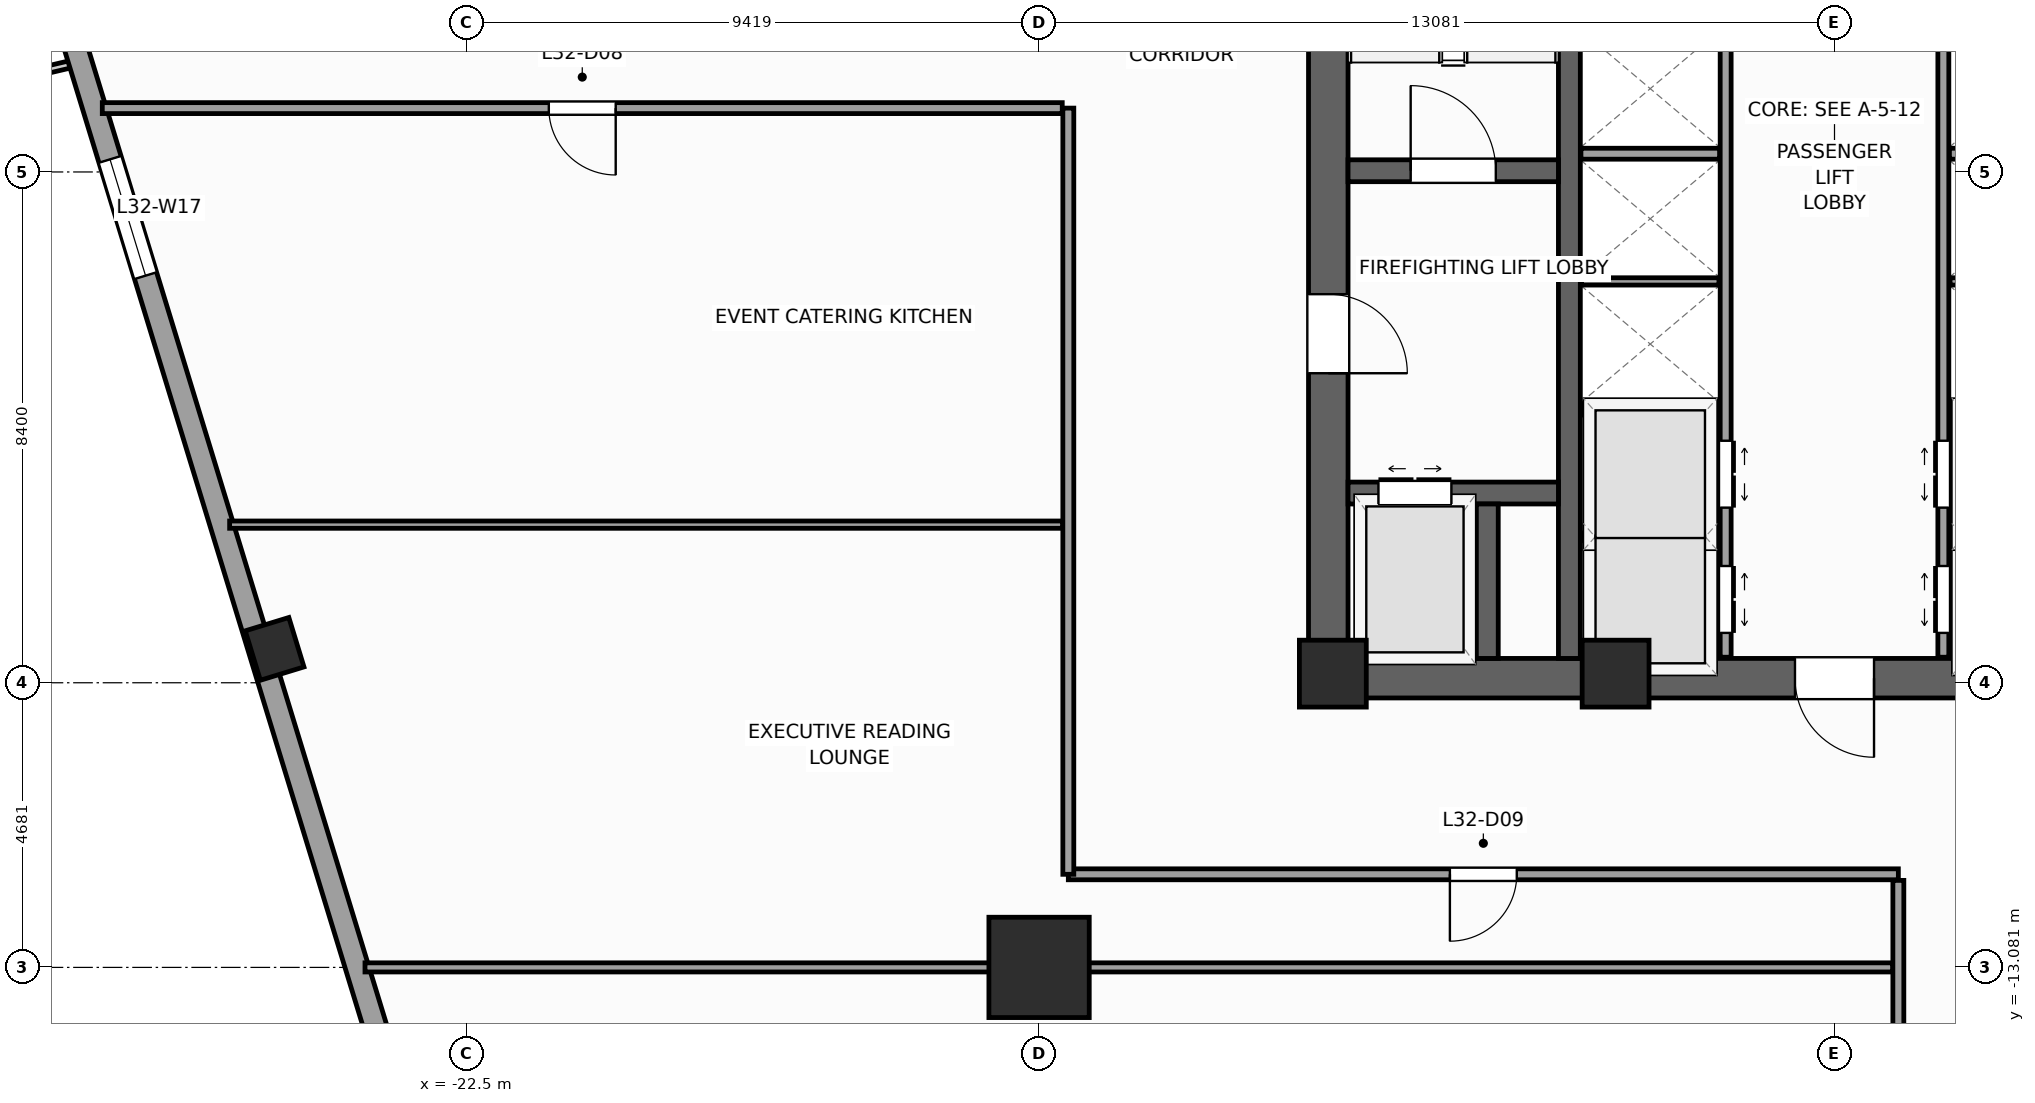
"""IFC4 building model, lengths in metres.
Left out: names, types, materials, properties, quantities, classifications, styles, units other than length and angle.
Written with IfcOpenShell. Run it as: python <this file> out.ifc"""

import sys

from ifc_helpers import new_model, si_unit, direction, frame, frame_2d, origin, origin_2d, place, context, subcontext, project, spatial, rectangle, extrude, source, transform, mapped, element, fill, save


model = new_model("IFC4")
c1 = context("Model", 3, precision=1e-05, world=origin(), true_north=direction((0.0, 1.0)))
c2 = subcontext(c1, "Body", "Model", "MODEL_VIEW")
j1 = project(units=[si_unit("LENGTHUNIT", "METRE"), si_unit("PLANEANGLEUNIT", "RADIAN")], contexts=[c1])
p1 = place(None, origin())
s1 = spatial("IfcSite", under=j1, at=p1, CompositionType="ELEMENT")
p2 = place(p1, origin())
s2 = spatial("IfcBuilding", under=s1, at=p2, CompositionType="ELEMENT")
p3 = place(p2, frame((0.0, 0.0, 135.2)))
s3 = spatial("IfcBuildingStorey", under=s2, at=p3, CompositionType="ELEMENT", Elevation=135.2)
p4 = place(p3, frame((-8.65, -8.325, 0.0), z_axis=(0.0, 0.0, 1.0), x_axis=(1.0, 0.0, 0.0)))
e1 = element("IfcWall", 1, at=p4, inside=s3, PredefinedType="SHEAR", context=c2, shape_type="SweptSolid", body=[
    extrude(rectangle(XDim=17.3, YDim=0.65, at=frame_2d((8.65, 0.0))), origin(), (0.0, 0.0, 1.0), 4.0),
])
p5 = place(p4, frame((8.0, 0.0, 0.0)))
e2 = element("IfcOpeningElement", 2, at=p5, cuts=e1, PredefinedType="OPENING", context=c2, shape_type="SweptSolid", body=[
    extrude(rectangle(XDim=1.3, YDim=2.2, at=frame_2d((0.65, 1.1))), frame((0.0, 0.335, 0.0), z_axis=(0.0, -1.0, 0.0), x_axis=(1.0, 0.0, 0.0)), (0.0, 0.0, 1.0), 0.67),
])
p6 = place(p3, frame((-8.325, -8.0, 0.0), z_axis=(0.0, 0.0, 1.0), x_axis=(0.0, 1.0, 0.0)))
e3 = element("IfcWall", 3, at=p6, inside=s3, PredefinedType="SHEAR", context=c2, shape_type="SweptSolid", body=[
    extrude(rectangle(XDim=16.0, YDim=0.65, at=frame_2d((8.0, 0.0))), origin(), (0.0, 0.0, 1.0), 4.0),
])
p7 = place(p6, frame((4.69, 0.0, 0.0)))
e4 = element("IfcOpeningElement", 4, at=p7, cuts=e3, PredefinedType="OPENING", context=c2, shape_type="SweptSolid", body=[
    extrude(rectangle(XDim=1.3, YDim=2.2, at=frame_2d((0.65, 1.1))), frame((0.0, 0.335, 0.0), z_axis=(0.0, -1.0, 0.0), x_axis=(1.0, 0.0, 0.0)), (0.0, 0.0, 1.0), 0.67),
])
p8 = place(p3, frame((-4.36, -8.0, 0.0), z_axis=(0.0, 0.0, 1.0), x_axis=(0.0, 1.0, 0.0)))
e5 = element("IfcWall", 5, at=p8, inside=s3, PredefinedType="SHEAR", context=c2, shape_type="SweptSolid", body=[
    extrude(rectangle(XDim=16.0, YDim=0.36, at=frame_2d((8.0, 0.0))), origin(), (0.0, 0.0, 1.0), 4.0),
])
p9 = place(p3, frame((-8.0, 0.02, 0.0), z_axis=(0.0, 0.0, 1.0), x_axis=(1.0, 0.0, 0.0)))
e6 = element("IfcWall", 6, at=p9, inside=s3, PredefinedType="SHEAR", context=c2, shape_type="SweptSolid", body=[
    extrude(rectangle(XDim=3.46, YDim=0.36, at=frame_2d((1.73, 0.0))), origin(), (0.0, 0.0, 1.0), 4.0),
])
p10 = place(p9, frame((1.03, 0.0, 0.0)))
e7 = element("IfcOpeningElement", 7, at=p10, cuts=e6, PredefinedType="OPENING", context=c2, shape_type="SweptSolid", body=[
    extrude(rectangle(XDim=1.4, YDim=2.2, at=frame_2d((0.7, 1.1))), frame((0.0, 0.19, 0.0), z_axis=(0.0, -1.0, 0.0), x_axis=(1.0, 0.0, 0.0)), (0.0, 0.0, 1.0), 0.38),
])
p11 = place(p3, frame((-8.0, -5.28, 0.0), z_axis=(0.0, 0.0, 1.0), x_axis=(1.0, 0.0, 0.0)))
e8 = element("IfcWall", 8, at=p11, inside=s3, PredefinedType="SHEAR", context=c2, shape_type="SweptSolid", body=[
    extrude(rectangle(XDim=3.46, YDim=0.36, at=frame_2d((1.73, 0.0))), origin(), (0.0, 0.0, 1.0), 4.0),
])
p12 = place(p11, frame((0.5, 0.0, 0.0)))
e9 = element("IfcOpeningElement", 9, at=p12, cuts=e8, PredefinedType="OPENING", context=c2, shape_type="SweptSolid", body=[
    extrude(rectangle(XDim=1.2, YDim=2.25, at=frame_2d((0.6, 1.125))), frame((0.0, 0.19, 0.0), z_axis=(0.0, -1.0, 0.0), x_axis=(1.0, 0.0, 0.0)), (0.0, 0.0, 1.0), 0.38),
])
p13 = place(p3, frame((-5.71, -8.0, 0.0), z_axis=(0.0, 0.0, 1.0), x_axis=(0.0, 1.0, 0.0)))
e10 = element("IfcWall", 10, at=p13, inside=s3, PredefinedType="SHEAR", context=c2, shape_type="SweptSolid", body=[
    extrude(rectangle(XDim=2.54, YDim=0.36, at=frame_2d((1.27, 0.0))), origin(), (0.0, 0.0, 1.0), 4.0),
])
m1 = source(origin(), c2, "Body", "SweptSolid", [
    extrude(rectangle(XDim=1.1, YDim=1.1, at=origin_2d()), origin(), (0.0, 0.0, 1.0), 4.0),
])
for number, where, z_axis, x_axis in (
    (11, (-8.25, -8.25, 0.0), (0.0, 0.0, 1.0), (1.0, 0.0, 0.0)),
    (12, (-3.6, -8.25, 0.0), (0.0, 0.0, 1.0), (1.0, 0.0, 0.0)),
):
    element("IfcColumn", number, at=place(p3, frame(where, z_axis=z_axis, x_axis=x_axis)), inside=s3, PredefinedType="PILASTER", context=c2, shape_type="MappedRepresentation", body=[
        mapped(m1, transform((0.0, 0.0, 0.0), scale=1.0)),
    ])
m2 = source(origin(), c2, "Body", "SweptSolid", [
    extrude(rectangle(XDim=1.65, YDim=1.65, at=origin_2d()), origin(), (0.0, 0.0, 1.0), 4.0),
])
p14 = place(p3, frame((-13.081, -13.081, 0.0), z_axis=(0.0, 0.0, 1.0), x_axis=(1.0, 0.0, 0.0)))
e13 = element("IfcColumn", 13, at=p14, inside=s3, PredefinedType="COLUMN", context=c2, shape_type="MappedRepresentation", body=[
    mapped(m2, transform((0.0, 0.0, 0.0), scale=1.0)),
])
m3 = source(origin(), c2, "Body", "SweptSolid", [
    extrude(rectangle(XDim=0.75, YDim=0.85, at=origin_2d()), origin(), (0.0, 0.0, 1.0), 4.0),
])
p15 = place(p3, frame((-25.653, -7.843, 0.0), z_axis=(0.0, 0.0, 1.0), x_axis=(0.956304755963, 0.292371704723, 0.0)))
e14 = element("IfcColumn", 14, at=p15, inside=s3, PredefinedType="COLUMN", context=c2, shape_type="MappedRepresentation", body=[
    mapped(m3, transform((0.0, 0.0, 0.0), scale=1.0)),
])
p16 = place(p3, frame((-32.658, 14.265, 0.0), z_axis=(0.0, 0.0, 1.0), x_axis=(0.292373127906, -0.956304320851, 0.0)))
e15 = element("IfcWall", 15, at=p16, inside=s3, PredefinedType="STANDARD", context=c2, shape_type="SweptSolid", body=[
    extrude(rectangle(XDim=46.38, YDim=0.38, at=frame_2d((23.19, 0.0))), origin(), (0.0, 0.0, 1.0), 2.2),
])
p17 = place(p16, frame((4.566, 0.0, 0.67)))
e16 = element("IfcOpeningElement", 16, at=p17, cuts=e15, PredefinedType="OPENING", context=c2, shape_type="SweptSolid", body=[
    extrude(rectangle(XDim=2.0, YDim=1.45, at=frame_2d((1.0, 0.725))), frame((0.0, 0.2, 0.0), z_axis=(0.0, -1.0, 0.0), x_axis=(1.0, 0.0, 0.0)), (0.0, 0.0, 1.0), 0.4),
])
p18 = place(p16, frame((14.7, 0.0, 0.67)))
e17 = element("IfcOpeningElement", 17, at=p18, cuts=e15, PredefinedType="OPENING", context=c2, shape_type="SweptSolid", body=[
    extrude(rectangle(XDim=2.0, YDim=1.45, at=frame_2d((1.0, 0.725))), frame((0.0, 0.2, 0.0), z_axis=(0.0, -1.0, 0.0), x_axis=(1.0, 0.0, 0.0)), (0.0, 0.0, 1.0), 0.4),
])
p19 = place(p16, frame((30.538, 0.0, 0.67)))
e18 = element("IfcOpeningElement", 18, at=p19, cuts=e15, PredefinedType="OPENING", context=c2, shape_type="SweptSolid", body=[
    extrude(rectangle(XDim=2.0, YDim=1.45, at=frame_2d((1.0, 0.725))), frame((0.0, 0.2, 0.0), z_axis=(0.0, -1.0, 0.0), x_axis=(1.0, 0.0, 0.0)), (0.0, 0.0, 1.0), 0.4),
])
p20 = place(p16, frame((38.887, 0.0, 0.67)))
e19 = element("IfcOpeningElement", 19, at=p20, cuts=e15, PredefinedType="OPENING", context=c2, shape_type="SweptSolid", body=[
    extrude(rectangle(XDim=2.0, YDim=1.45, at=frame_2d((1.0, 0.725))), frame((0.0, 0.2, 0.0), z_axis=(0.0, -1.0, 0.0), x_axis=(1.0, 0.0, 0.0)), (0.0, 0.0, 1.0), 0.4),
])
p21 = place(p3, frame((-1.79, -7.98, 0.0), z_axis=(0.0, 0.0, 1.0), x_axis=(0.0, 1.0, 0.0)))
e20 = element("IfcWall", 20, at=p21, inside=s3, PredefinedType="PARTITIONING", context=c2, shape_type="SweptSolid", body=[
    extrude(rectangle(XDim=12.38, YDim=0.18, at=frame_2d((6.19, 0.0))), origin(), (0.0, 0.0, 1.0), 3.6),
])
p22 = place(p21, frame((0.4, 0.0, 0.0)))
e21 = element("IfcOpeningElement", 21, at=p22, cuts=e20, PredefinedType="OPENING", context=c2, shape_type="SweptSolid", body=[
    extrude(rectangle(XDim=1.1, YDim=2.2, at=frame_2d((0.55, 1.1))), frame((0.0, 0.1, 0.0), z_axis=(0.0, -1.0, 0.0), x_axis=(1.0, 0.0, 0.0)), (0.0, 0.0, 1.0), 0.2),
])
p23 = place(p21, frame((2.46, 0.0, 0.0)))
e22 = element("IfcOpeningElement", 22, at=p23, cuts=e20, PredefinedType="OPENING", context=c2, shape_type="SweptSolid", body=[
    extrude(rectangle(XDim=1.1, YDim=2.2, at=frame_2d((0.55, 1.1))), frame((0.0, 0.1, 0.0), z_axis=(0.0, -1.0, 0.0), x_axis=(1.0, 0.0, 0.0)), (0.0, 0.0, 1.0), 0.2),
])
p24 = place(p3, frame((1.79, -7.98, 0.0), z_axis=(0.0, 0.0, 1.0), x_axis=(0.0, 1.0, 0.0)))
e23 = element("IfcWall", 23, at=p24, inside=s3, PredefinedType="PARTITIONING", context=c2, shape_type="SweptSolid", body=[
    extrude(rectangle(XDim=12.38, YDim=0.18, at=frame_2d((6.19, 0.0))), origin(), (0.0, 0.0, 1.0), 3.6),
])
p25 = place(p24, frame((0.4, 0.0, 0.0)))
e24 = element("IfcOpeningElement", 24, at=p25, cuts=e23, PredefinedType="OPENING", context=c2, shape_type="SweptSolid", body=[
    extrude(rectangle(XDim=1.1, YDim=2.2, at=frame_2d((0.55, 1.1))), frame((0.0, 0.1, 0.0), z_axis=(0.0, -1.0, 0.0), x_axis=(1.0, 0.0, 0.0)), (0.0, 0.0, 1.0), 0.2),
])
p26 = place(p24, frame((2.46, 0.0, 0.0)))
e25 = element("IfcOpeningElement", 25, at=p26, cuts=e23, PredefinedType="OPENING", context=c2, shape_type="SweptSolid", body=[
    extrude(rectangle(XDim=1.1, YDim=2.2, at=frame_2d((0.55, 1.1))), frame((0.0, 0.1, 0.0), z_axis=(0.0, -1.0, 0.0), x_axis=(1.0, 0.0, 0.0)), (0.0, 0.0, 1.0), 0.2),
])
for number, where, z_axis, x_axis in (
    (26, (-4.17, -3.9, 0.0), (0.0, 0.0, 1.0), (1.0, 0.0, 0.0)),
    (27, (1.89, -3.9, 0.0), (0.0, 0.0, 1.0), (1.0, 0.0, 0.0)),
    (28, (-4.17, 0.3, 0.0), (0.0, 0.0, 1.0), (1.0, 0.0, 0.0)),
    (29, (1.89, 0.3, 0.0), (0.0, 0.0, 1.0), (1.0, 0.0, 0.0)),
):
    element("IfcWall", number, at=place(p3, frame(where, z_axis=z_axis, x_axis=x_axis)), inside=s3, PredefinedType="PARTITIONING", context=c2, shape_type="SweptSolid", body=[
        extrude(rectangle(XDim=2.28, YDim=0.18, at=frame_2d((1.14, 0.0))), origin(), (0.0, 0.0, 1.0), 3.6),
    ])
for number, where, z_axis, x_axis in (
    (30, (-4.16, -6.0, 0.0), (0.0, 0.0, 1.0), (1.0, 0.0, 0.0)),
    (31, (1.9, -6.0, 0.0), (0.0, 0.0, 1.0), (1.0, 0.0, 0.0)),
    (32, (-4.16, -1.8, 0.0), (0.0, 0.0, 1.0), (1.0, 0.0, 0.0)),
    (33, (1.9, -1.8, 0.0), (0.0, 0.0, 1.0), (1.0, 0.0, 0.0)),
):
    element("IfcWall", number, at=place(p3, frame(where, z_axis=z_axis, x_axis=x_axis)), inside=s3, PredefinedType="PARTITIONING", context=c2, shape_type="SweptSolid", body=[
        extrude(rectangle(XDim=2.26, YDim=0.12, at=frame_2d((1.13, 0.0))), origin(), (0.0, 0.0, 1.0), 3.6),
    ])
p27 = place(p3, frame((-12.6, -11.55, 0.0), z_axis=(0.0, 0.0, 1.0), x_axis=(1.0, 0.0, 0.0)))
e34 = element("IfcWall", 34, at=p27, inside=s3, PredefinedType="PARTITIONING", context=c2, shape_type="SweptSolid", body=[
    extrude(rectangle(XDim=13.65, YDim=0.18, at=frame_2d((6.825, 0.0))), origin(), (0.0, 0.0, 1.0), 3.6),
])
p28 = place(p27, frame((6.275, 0.0, 0.0)))
e35 = element("IfcOpeningElement", 35, at=p28, cuts=e34, PredefinedType="OPENING", context=c2, shape_type="SweptSolid", body=[
    extrude(rectangle(XDim=1.1, YDim=2.2, at=frame_2d((0.55, 1.1))), frame((0.0, 0.1, 0.0), z_axis=(0.0, -1.0, 0.0), x_axis=(1.0, 0.0, 0.0)), (0.0, 0.0, 1.0), 0.2),
])
p29 = place(p3, frame((-12.6, -11.55, 0.0), z_axis=(0.0, 0.0, 1.0), x_axis=(0.0, 1.0, 0.0)))
e36 = element("IfcWall", 36, at=p29, inside=s3, PredefinedType="PARTITIONING", context=c2, shape_type="SweptSolid", body=[
    extrude(rectangle(XDim=12.6, YDim=0.18, at=frame_2d((6.3, 0.0))), origin(), (0.0, 0.0, 1.0), 2.56),
])
p30 = place(p3, frame((-28.487, 1.05, 0.0), z_axis=(0.0, 0.0, 1.0), x_axis=(1.0, 0.0, 0.0)))
e37 = element("IfcWall", 37, at=p30, inside=s3, PredefinedType="PARTITIONING", context=c2, shape_type="SweptSolid", body=[
    extrude(rectangle(XDim=15.787, YDim=0.18, at=frame_2d((7.894, 0.0))), origin(), (0.0, 0.0, 1.0), 3.6),
])
p31 = place(p30, frame((7.343, 0.0, 0.0)))
e38 = element("IfcOpeningElement", 38, at=p31, cuts=e37, PredefinedType="OPENING", context=c2, shape_type="SweptSolid", body=[
    extrude(rectangle(XDim=1.1, YDim=2.2, at=frame_2d((0.55, 1.1))), frame((0.0, 0.1, 0.0), z_axis=(0.0, -1.0, 0.0), x_axis=(1.0, 0.0, 0.0)), (0.0, 0.0, 1.0), 0.2),
])
p32 = place(p3, frame((1.05, -27.845, 0.0), z_axis=(0.0, 0.0, 1.0), x_axis=(0.0, 1.0, 0.0)))
e39 = element("IfcWall", 39, at=p32, inside=s3, PredefinedType="PARTITIONING", context=c2, shape_type="SweptSolid", body=[
    extrude(rectangle(XDim=16.195, YDim=0.18, at=frame_2d((8.097, 0.0))), origin(), (0.0, 0.0, 1.0), 3.6),
])
p33 = place(p32, frame((6.996, 0.0, 0.0)))
e40 = element("IfcOpeningElement", 40, at=p33, cuts=e39, PredefinedType="OPENING", context=c2, shape_type="SweptSolid", body=[
    extrude(rectangle(XDim=1.1, YDim=2.2, at=frame_2d((0.55, 1.1))), frame((0.0, 0.1, 0.0), z_axis=(0.0, -1.0, 0.0), x_axis=(1.0, 0.0, 0.0)), (0.0, 0.0, 1.0), 0.2),
])
p34 = place(p3, frame((-24.167, -13.081, 0.0), z_axis=(0.0, 0.0, 1.0), x_axis=(1.0, 0.0, 0.0)))
e41 = element("IfcWall", 41, at=p34, inside=s3, PredefinedType="PARTITIONING", context=c2, shape_type="SweptSolid", body=[
    extrude(rectangle(XDim=25.122, YDim=0.15, at=frame_2d((12.561, 0.0))), origin(), (0.0, 0.0, 1.0), 2.2),
])
p35 = place(p3, frame((-26.393, -5.8, 0.0), z_axis=(0.0, 0.0, 1.0), x_axis=(1.0, 0.0, 0.0)))
e42 = element("IfcWall", 42, at=p35, inside=s3, PredefinedType="PARTITIONING", context=c2, shape_type="SweptSolid", body=[
    extrude(rectangle(XDim=13.698, YDim=0.12, at=frame_2d((6.849, 0.0))), origin(), (0.0, 0.0, 1.0), 3.6),
])
m4 = source(origin(), c2, "Body", "SweptSolid", [
    extrude(rectangle(XDim=2.0, YDim=1.45, at=frame_2d((1.0, 0.725))), frame((0.0, 0.03, 0.0), z_axis=(0.0, -1.0, 0.0), x_axis=(1.0, 0.0, 0.0)), (0.0, 0.0, 1.0), 0.06),
])
p36 = place(p18, origin())
e43 = element("IfcWindow", 43, at=p36, inside=s3, PartitioningType="SINGLE_PANEL", PredefinedType="WINDOW", context=c2, shape_type="MappedRepresentation", body=[
    mapped(m4, transform((0.0, 0.0, 0.0), scale=1.0)),
])
fill(e17, e43)
m5 = source(origin(), c2, "Body", "SweptSolid", [
    extrude(rectangle(XDim=1.4, YDim=2.2, at=frame_2d((0.7, 1.1))), frame((0.0, 0.025, 0.0), z_axis=(0.0, -1.0, 0.0), x_axis=(1.0, 0.0, 0.0)), (0.0, 0.0, 1.0), 0.05),
])
p37 = place(p10, origin())
e44 = element("IfcDoor", 44, at=p37, inside=s3, OperationType="SINGLE_SWING_LEFT", PredefinedType="DOOR", context=c2, shape_type="MappedRepresentation", body=[
    mapped(m5, transform((0.0, 0.0, 0.0), scale=1.0)),
])
fill(e7, e44)
m6 = source(origin(), c2, "Body", "SweptSolid", [
    extrude(rectangle(XDim=1.3, YDim=2.2, at=frame_2d((0.65, 1.1))), frame((0.0, 0.025, 0.0), z_axis=(0.0, -1.0, 0.0), x_axis=(1.0, 0.0, 0.0)), (0.0, 0.0, 1.0), 0.05),
])
p38 = place(p7, frame((1.3, 0.0, 0.0), z_axis=(0.0, 0.0, 1.0), x_axis=(-1.0, 0.0, 0.0)))
e45 = element("IfcDoor", 45, at=p38, inside=s3, OperationType="SINGLE_SWING_LEFT", PredefinedType="DOOR", context=c2, shape_type="MappedRepresentation", body=[
    mapped(m6, transform((0.0, 0.0, 0.0), scale=1.0)),
])
fill(e4, e45)
p39 = place(p5, frame((1.3, 0.0, 0.0), z_axis=(0.0, 0.0, 1.0), x_axis=(-1.0, 0.0, 0.0)))
e46 = element("IfcDoor", 46, at=p39, inside=s3, OperationType="SINGLE_SWING_RIGHT", PredefinedType="DOOR", context=c2, shape_type="MappedRepresentation", body=[
    mapped(m6, transform((0.0, 0.0, 0.0), scale=1.0)),
])
fill(e2, e46)
m7 = source(origin(), c2, "Body", "SweptSolid", [
    extrude(rectangle(XDim=1.2, YDim=2.25, at=frame_2d((0.6, 1.125))), frame((0.0, 0.025, 0.0), z_axis=(0.0, -1.0, 0.0), x_axis=(1.0, 0.0, 0.0)), (0.0, 0.0, 1.0), 0.05),
])
p40 = place(p12, origin())
e47 = element("IfcDoor", 47, at=p40, inside=s3, OperationType="DOUBLE_DOOR_SLIDING", PredefinedType="DOOR", context=c2, shape_type="MappedRepresentation", body=[
    mapped(m7, transform((0.0, 0.0, 0.0), scale=1.0)),
])
fill(e9, e47)
m8 = source(origin(), c2, "Body", "SweptSolid", [
    extrude(rectangle(XDim=1.1, YDim=2.2, at=frame_2d((0.55, 1.1))), frame((0.0, 0.025, 0.0), z_axis=(0.0, -1.0, 0.0), x_axis=(1.0, 0.0, 0.0)), (0.0, 0.0, 1.0), 0.05),
])
p41 = place(p22, frame((1.1, 0.0, 0.0), z_axis=(0.0, 0.0, 1.0), x_axis=(-1.0, 0.0, 0.0)))
e48 = element("IfcDoor", 48, at=p41, inside=s3, OperationType="DOUBLE_DOOR_SLIDING", PredefinedType="DOOR", context=c2, shape_type="MappedRepresentation", body=[
    mapped(m8, transform((0.0, 0.0, 0.0), scale=1.0)),
])
fill(e21, e48)
p42 = place(p23, frame((1.1, 0.0, 0.0), z_axis=(0.0, 0.0, 1.0), x_axis=(-1.0, 0.0, 0.0)))
e49 = element("IfcDoor", 49, at=p42, inside=s3, OperationType="DOUBLE_DOOR_SLIDING", PredefinedType="DOOR", context=c2, shape_type="MappedRepresentation", body=[
    mapped(m8, transform((0.0, 0.0, 0.0), scale=1.0)),
])
fill(e22, e49)
p43 = place(p25, origin())
e50 = element("IfcDoor", 50, at=p43, inside=s3, OperationType="DOUBLE_DOOR_SLIDING", PredefinedType="DOOR", context=c2, shape_type="MappedRepresentation", body=[
    mapped(m8, transform((0.0, 0.0, 0.0), scale=1.0)),
])
fill(e24, e50)
p44 = place(p26, origin())
e51 = element("IfcDoor", 51, at=p44, inside=s3, OperationType="DOUBLE_DOOR_SLIDING", PredefinedType="DOOR", context=c2, shape_type="MappedRepresentation", body=[
    mapped(m8, transform((0.0, 0.0, 0.0), scale=1.0)),
])
fill(e25, e51)
p45 = place(p31, frame((1.1, 0.0, 0.0), z_axis=(0.0, 0.0, 1.0), x_axis=(-1.0, 0.0, 0.0)))
e52 = element("IfcDoor", 52, at=p45, inside=s3, OperationType="SINGLE_SWING_RIGHT", PredefinedType="DOOR", context=c2, shape_type="MappedRepresentation", body=[
    mapped(m8, transform((0.0, 0.0, 0.0), scale=1.0)),
])
fill(e38, e52)
p46 = place(p28, frame((1.1, 0.0, 0.0), z_axis=(0.0, 0.0, 1.0), x_axis=(-1.0, 0.0, 0.0)))
e53 = element("IfcDoor", 53, at=p46, inside=s3, OperationType="SINGLE_SWING_LEFT", PredefinedType="DOOR", context=c2, shape_type="MappedRepresentation", body=[
    mapped(m8, transform((0.0, 0.0, 0.0), scale=1.0)),
])
fill(e35, e53)
save(model, sys.argv[1])
